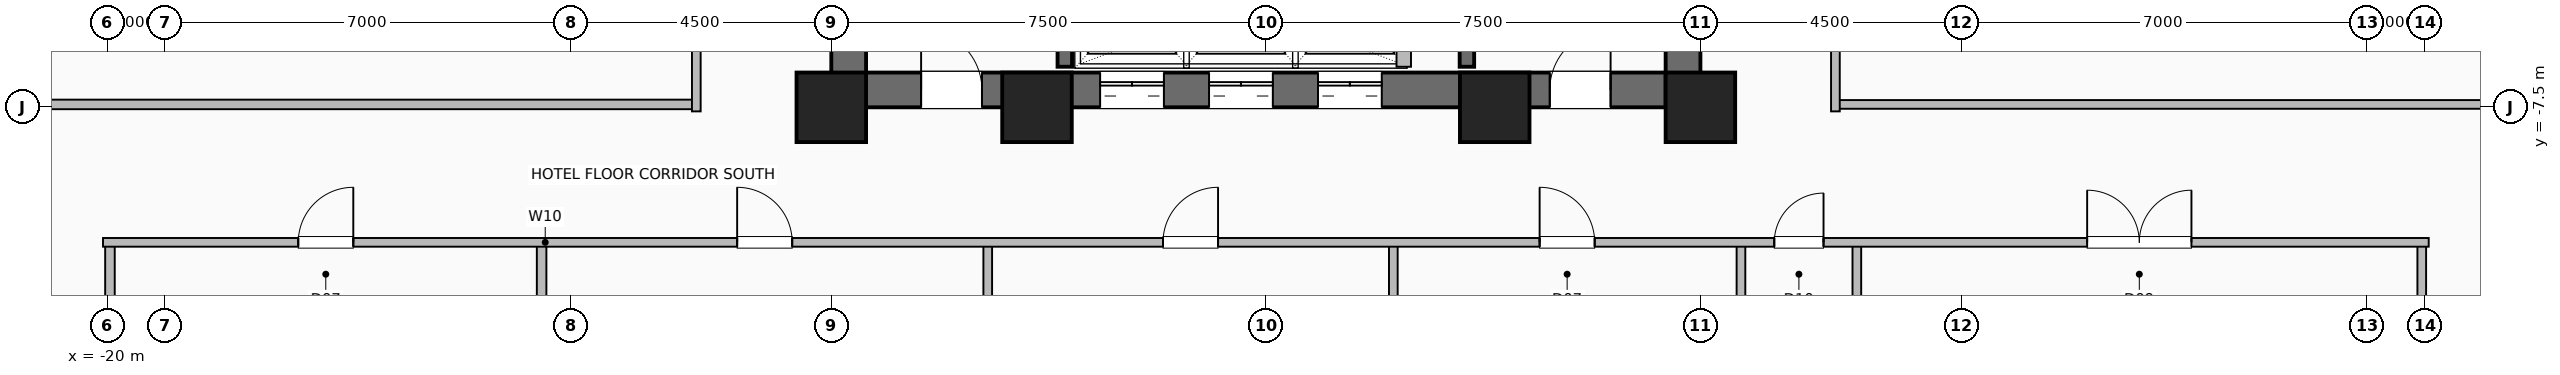
"""IFC4 building model, lengths in metres.
Left out: names, types, materials, properties, quantities, classifications, styles, units other than length and angle.
Written with IfcOpenShell. Run it as: python <this file> out.ifc"""

import sys

from ifc_helpers import new_model, si_unit, direction, frame, frame_2d, origin, origin_2d, place, context, subcontext, project, spatial, rectangle, hollow_rectangle, extrude, element, fill, save


model = new_model("IFC4")
c1 = context("Model", 3, precision=1e-05, world=origin(), true_north=direction((0.0, 1.0)))
c2 = subcontext(c1, "Body", "Model", "MODEL_VIEW")
j1 = project(units=[si_unit("LENGTHUNIT", "METRE"), si_unit("PLANEANGLEUNIT", "RADIAN")], contexts=[c1])
p1 = place(None, origin())
s1 = spatial("IfcSite", under=j1, at=p1, CompositionType="ELEMENT")
p2 = place(p1, origin())
s2 = spatial("IfcBuilding", under=s1, at=p2, CompositionType="ELEMENT")
p3 = place(p2, frame((0.0, 0.0, 44.5)))
s3 = spatial("IfcBuildingStorey", under=s2, at=p3, CompositionType="ELEMENT", Elevation=44.5)
for number, where, z_axis, x_axis in (
    (1, (-7.5, -7.5, 0.0), (0.0, 0.0, 1.0), (1.0, 0.0, 0.0)),
    (2, (-3.95, -7.5, 0.0), (0.0, 0.0, 1.0), (1.0, 0.0, 0.0)),
    (3, (3.95, -7.5, 0.0), (0.0, 0.0, 1.0), (1.0, 0.0, 0.0)),
    (4, (7.5, -7.5, 0.0), (0.0, 0.0, 1.0), (1.0, 0.0, 0.0)),
):
    element("IfcColumn", number, at=place(p3, frame(where, z_axis=z_axis, x_axis=x_axis)), inside=s3, PredefinedType="COLUMN", context=c2, shape_type="SweptSolid", body=[
        extrude(hollow_rectangle(XDim=1.2, YDim=1.2, WallThickness=0.055, at=origin_2d()), origin(), (0.0, 0.0, 1.0), 3.5),
    ])
p4 = place(p3, frame((-7.5, -7.2, 0.0), z_axis=(0.0, 0.0, 1.0), x_axis=(1.0, 0.0, 0.0)))
e5 = element("IfcWall", 5, at=p4, inside=s3, PredefinedType="SHEAR", context=c2, shape_type="SweptSolid", body=[
    extrude(rectangle(XDim=15.0, YDim=0.6, at=frame_2d((7.5, 0.0))), origin(), (0.0, 0.0, 1.0), 3.25),
])
p5 = place(p4, frame((1.55, 0.0, 0.0)))
e6 = element("IfcOpeningElement", 6, at=p5, cuts=e5, PredefinedType="OPENING", context=c2, shape_type="SweptSolid", body=[
    extrude(rectangle(XDim=1.05, YDim=2.08, at=frame_2d((0.525, 1.04))), frame((0.0, 0.31, 0.0), z_axis=(0.0, -1.0, 0.0), x_axis=(1.0, 0.0, 0.0)), (0.0, 0.0, 1.0), 0.62),
])
p6 = place(p4, frame((12.4, 0.0, 0.0)))
e7 = element("IfcOpeningElement", 7, at=p6, cuts=e5, PredefinedType="OPENING", context=c2, shape_type="SweptSolid", body=[
    extrude(rectangle(XDim=1.05, YDim=2.08, at=frame_2d((0.525, 1.04))), frame((0.0, 0.31, 0.0), z_axis=(0.0, -1.0, 0.0), x_axis=(1.0, 0.0, 0.0)), (0.0, 0.0, 1.0), 0.62),
])
p7 = place(p4, frame((4.64, 0.0, 0.0)))
e8 = element("IfcOpeningElement", 8, at=p7, cuts=e5, PredefinedType="OPENING", context=c2, shape_type="SweptSolid", body=[
    extrude(rectangle(XDim=1.1, YDim=2.2, at=frame_2d((0.55, 1.1))), frame((0.0, 0.31, 0.0), z_axis=(0.0, -1.0, 0.0), x_axis=(1.0, 0.0, 0.0)), (0.0, 0.0, 1.0), 0.62),
])
p8 = place(p4, frame((6.52, 0.0, 0.0)))
e9 = element("IfcOpeningElement", 9, at=p8, cuts=e5, PredefinedType="OPENING", context=c2, shape_type="SweptSolid", body=[
    extrude(rectangle(XDim=1.1, YDim=2.2, at=frame_2d((0.55, 1.1))), frame((0.0, 0.31, 0.0), z_axis=(0.0, -1.0, 0.0), x_axis=(1.0, 0.0, 0.0)), (0.0, 0.0, 1.0), 0.62),
])
p9 = place(p4, frame((8.4, 0.0, 0.0)))
e10 = element("IfcOpeningElement", 10, at=p9, cuts=e5, PredefinedType="OPENING", context=c2, shape_type="SweptSolid", body=[
    extrude(rectangle(XDim=1.1, YDim=2.2, at=frame_2d((0.55, 1.1))), frame((0.0, 0.31, 0.0), z_axis=(0.0, -1.0, 0.0), x_axis=(1.0, 0.0, 0.0)), (0.0, 0.0, 1.0), 0.62),
])
p10 = place(p3, frame((-7.2, -7.5, 0.0), z_axis=(0.0, 0.0, 1.0), x_axis=(0.0, 1.0, 0.0)))
e11 = element("IfcWall", 11, at=p10, inside=s3, PredefinedType="SHEAR", context=c2, shape_type="SweptSolid", body=[
    extrude(rectangle(XDim=15.0, YDim=0.6, at=frame_2d((7.5, 0.0))), origin(), (0.0, 0.0, 1.0), 3.25),
])
p11 = place(p10, frame((9.5, 0.0, 0.0)))
e12 = element("IfcOpeningElement", 12, at=p11, cuts=e11, PredefinedType="OPENING", context=c2, shape_type="SweptSolid", body=[
    extrude(rectangle(XDim=1.0, YDim=2.08, at=frame_2d((0.5, 1.04))), frame((0.0, 0.31, 0.0), z_axis=(0.0, -1.0, 0.0), x_axis=(1.0, 0.0, 0.0)), (0.0, 0.0, 1.0), 0.62),
])
p12 = place(p3, frame((7.2, -7.5, 0.0), z_axis=(0.0, 0.0, 1.0), x_axis=(0.0, 1.0, 0.0)))
e13 = element("IfcWall", 13, at=p12, inside=s3, PredefinedType="SHEAR", context=c2, shape_type="SweptSolid", body=[
    extrude(rectangle(XDim=15.0, YDim=0.6, at=frame_2d((7.5, 0.0))), origin(), (0.0, 0.0, 1.0), 3.25),
])
for number, where, z_axis, x_axis in (
    (14, (-3.47, -6.8, 0.0), (0.0, 0.0, 1.0), (0.0, 1.0, 0.0)),
    (15, (3.47, -6.8, 0.0), (0.0, 0.0, 1.0), (0.0, 1.0, 0.0)),
):
    element("IfcWall", number, at=place(p3, frame(where, z_axis=z_axis, x_axis=x_axis)), inside=s3, PredefinedType="SHEAR", context=c2, shape_type="SweptSolid", body=[
        extrude(rectangle(XDim=7.72, YDim=0.25, at=frame_2d((3.86, 0.0))), origin(), (0.0, 0.0, 1.0), 3.25),
    ])
p13 = place(p3, frame((2.38, -6.8, 0.0), z_axis=(0.0, 0.0, 1.0), x_axis=(0.0, 1.0, 0.0)))
e16 = element("IfcWall", 16, at=p13, inside=s3, PredefinedType="SHEAR", context=c2, shape_type="SweptSolid", body=[
    extrude(rectangle(XDim=2.22, YDim=0.25, at=frame_2d((1.11, 0.0))), origin(), (0.0, 0.0, 1.0), 3.25),
])
for number, where, z_axis, x_axis in (
    (17, (-19.95, -23.82, 0.0), (0.0, 0.0, 1.0), (0.0, 1.0, 0.0)),
    (18, (-12.5, -23.82, 0.0), (0.0, 0.0, 1.0), (0.0, 1.0, 0.0)),
):
    element("IfcWall", number, at=place(p3, frame(where, z_axis=z_axis, x_axis=x_axis)), inside=s3, PredefinedType="PLUMBINGWALL", context=c2, shape_type="SweptSolid", body=[
        extrude(rectangle(XDim=13.99, YDim=0.165, at=frame_2d((6.995, 0.0))), origin(), (0.0, 0.0, 1.0), 3.25),
    ])
p14 = place(p3, frame((-4.8, -23.82, 0.0), z_axis=(0.0, 0.0, 1.0), x_axis=(0.0, 1.0, 0.0)))
e19 = element("IfcWall", 19, at=p14, inside=s3, PredefinedType="PARTITIONING", context=c2, shape_type="SweptSolid", body=[
    extrude(rectangle(XDim=13.99, YDim=0.15, at=frame_2d((6.995, 0.0))), origin(), (0.0, 0.0, 1.0), 2.818),
])
for number, where, z_axis, x_axis in (
    (20, (2.2, -23.82, 0.0), (0.0, 0.0, 1.0), (0.0, 1.0, 0.0)),
    (21, (8.2, -23.82, 0.0), (0.0, 0.0, 1.0), (0.0, 1.0, 0.0)),
    (22, (10.2, -23.82, 0.0), (0.0, 0.0, 1.0), (0.0, 1.0, 0.0)),
    (23, (19.95, -23.82, 0.0), (0.0, 0.0, 1.0), (0.0, 1.0, 0.0)),
):
    element("IfcWall", number, at=place(p3, frame(where, z_axis=z_axis, x_axis=x_axis)), inside=s3, PredefinedType="PARTITIONING", context=c2, shape_type="SweptSolid", body=[
        extrude(rectangle(XDim=13.99, YDim=0.15, at=frame_2d((6.995, 0.0))), origin(), (0.0, 0.0, 1.0), 3.25),
    ])
p15 = place(p3, frame((-20.07, -9.83, 0.0), z_axis=(0.0, 0.0, 1.0), x_axis=(1.0, 0.0, 0.0)))
e24 = element("IfcWall", 24, at=p15, inside=s3, PredefinedType="PARTITIONING", context=c2, shape_type="SweptSolid", body=[
    extrude(rectangle(XDim=40.14, YDim=0.15, at=frame_2d((20.07, 0.0))), origin(), (0.0, 0.0, 1.0), 3.25),
])
p16 = place(p15, frame((3.37, 0.0, 0.0)))
e25 = element("IfcOpeningElement", 25, at=p16, cuts=e24, PredefinedType="OPENING", context=c2, shape_type="SweptSolid", body=[
    extrude(rectangle(XDim=0.95, YDim=2.06, at=frame_2d((0.475, 1.03))), frame((0.0, 0.085, 0.0), z_axis=(0.0, -1.0, 0.0), x_axis=(1.0, 0.0, 0.0)), (0.0, 0.0, 1.0), 0.17),
])
p17 = place(p15, frame((10.945, 0.0, 0.0)))
e26 = element("IfcOpeningElement", 26, at=p17, cuts=e24, PredefinedType="OPENING", context=c2, shape_type="SweptSolid", body=[
    extrude(rectangle(XDim=0.95, YDim=2.06, at=frame_2d((0.475, 1.03))), frame((0.0, 0.085, 0.0), z_axis=(0.0, -1.0, 0.0), x_axis=(1.0, 0.0, 0.0)), (0.0, 0.0, 1.0), 0.17),
])
p18 = place(p15, frame((18.295, 0.0, 0.0)))
e27 = element("IfcOpeningElement", 27, at=p18, cuts=e24, PredefinedType="OPENING", context=c2, shape_type="SweptSolid", body=[
    extrude(rectangle(XDim=0.95, YDim=2.06, at=frame_2d((0.475, 1.03))), frame((0.0, 0.085, 0.0), z_axis=(0.0, -1.0, 0.0), x_axis=(1.0, 0.0, 0.0)), (0.0, 0.0, 1.0), 0.17),
])
p19 = place(p15, frame((24.795, 0.0, 0.0)))
e28 = element("IfcOpeningElement", 28, at=p19, cuts=e24, PredefinedType="OPENING", context=c2, shape_type="SweptSolid", body=[
    extrude(rectangle(XDim=0.95, YDim=2.06, at=frame_2d((0.475, 1.03))), frame((0.0, 0.085, 0.0), z_axis=(0.0, -1.0, 0.0), x_axis=(1.0, 0.0, 0.0)), (0.0, 0.0, 1.0), 0.17),
])
p20 = place(p15, frame((28.845, 0.0, 0.0)))
e29 = element("IfcOpeningElement", 29, at=p20, cuts=e24, PredefinedType="OPENING", context=c2, shape_type="SweptSolid", body=[
    extrude(rectangle(XDim=0.85, YDim=2.05, at=frame_2d((0.425, 1.025))), frame((0.0, 0.085, 0.0), z_axis=(0.0, -1.0, 0.0), x_axis=(1.0, 0.0, 0.0)), (0.0, 0.0, 1.0), 0.17),
])
p21 = place(p15, frame((34.245, 0.0, 0.0)))
e30 = element("IfcOpeningElement", 30, at=p21, cuts=e24, PredefinedType="OPENING", context=c2, shape_type="SweptSolid", body=[
    extrude(rectangle(XDim=1.8, YDim=2.08, at=frame_2d((0.9, 1.04))), frame((0.0, 0.085, 0.0), z_axis=(0.0, -1.0, 0.0), x_axis=(1.0, 0.0, 0.0)), (0.0, 0.0, 1.0), 0.17),
])
p22 = place(p3, frame((-23.82, -7.45, 0.0), z_axis=(0.0, 0.0, 1.0), x_axis=(1.0, 0.0, 0.0)))
e31 = element("IfcWall", 31, at=p22, inside=s3, PredefinedType="PLUMBINGWALL", context=c2, shape_type="SweptSolid", body=[
    extrude(rectangle(XDim=13.99, YDim=0.165, at=frame_2d((6.995, 0.0))), origin(), (0.0, 0.0, 1.0), 3.25),
])
p23 = place(p3, frame((-9.83, -7.57, 0.0), z_axis=(0.0, 0.0, 1.0), x_axis=(0.0, 1.0, 0.0)))
e32 = element("IfcWall", 32, at=p23, inside=s3, PredefinedType="PARTITIONING", context=c2, shape_type="SweptSolid", body=[
    extrude(rectangle(XDim=15.14, YDim=0.15, at=frame_2d((7.57, 0.0))), origin(), (0.0, 0.0, 1.0), 3.25),
])
p24 = place(p23, frame((4.845, 0.0, 0.0)))
e33 = element("IfcOpeningElement", 33, at=p24, cuts=e32, PredefinedType="OPENING", context=c2, shape_type="SweptSolid", body=[
    extrude(rectangle(XDim=1.8, YDim=2.08, at=frame_2d((0.9, 1.04))), frame((0.0, 0.085, 0.0), z_axis=(0.0, -1.0, 0.0), x_axis=(1.0, 0.0, 0.0)), (0.0, 0.0, 1.0), 0.17),
])
p25 = place(p23, frame((11.77, 0.0, 0.0)))
e34 = element("IfcOpeningElement", 34, at=p25, cuts=e32, PredefinedType="OPENING", context=c2, shape_type="SweptSolid", body=[
    extrude(rectangle(XDim=0.85, YDim=2.05, at=frame_2d((0.425, 1.025))), frame((0.0, 0.085, 0.0), z_axis=(0.0, -1.0, 0.0), x_axis=(1.0, 0.0, 0.0)), (0.0, 0.0, 1.0), 0.17),
])
p26 = place(p23, frame((13.545, 0.0, 0.0)))
e35 = element("IfcOpeningElement", 35, at=p26, cuts=e32, PredefinedType="OPENING", context=c2, shape_type="SweptSolid", body=[
    extrude(rectangle(XDim=0.95, YDim=2.06, at=frame_2d((0.475, 1.03))), frame((0.0, 0.085, 0.0), z_axis=(0.0, -1.0, 0.0), x_axis=(1.0, 0.0, 0.0)), (0.0, 0.0, 1.0), 0.17),
])
p27 = place(p3, frame((9.83, -7.45, 0.0), z_axis=(0.0, 0.0, 1.0), x_axis=(1.0, 0.0, 0.0)))
e36 = element("IfcWall", 36, at=p27, inside=s3, PredefinedType="PARTITIONING", context=c2, shape_type="SweptSolid", body=[
    extrude(rectangle(XDim=13.99, YDim=0.15, at=frame_2d((6.995, 0.0))), origin(), (0.0, 0.0, 1.0), 3.25),
])
p28 = place(p3, frame((9.83, -7.57, 0.0), z_axis=(0.0, 0.0, 1.0), x_axis=(0.0, 1.0, 0.0)))
e37 = element("IfcWall", 37, at=p28, inside=s3, PredefinedType="PARTITIONING", context=c2, shape_type="SweptSolid", body=[
    extrude(rectangle(XDim=15.14, YDim=0.15, at=frame_2d((7.57, 0.0))), origin(), (0.0, 0.0, 1.0), 3.25),
])
p29 = place(p28, frame((2.12, 0.0, 0.0)))
e38 = element("IfcOpeningElement", 38, at=p29, cuts=e37, PredefinedType="OPENING", context=c2, shape_type="SweptSolid", body=[
    extrude(rectangle(XDim=0.95, YDim=2.06, at=frame_2d((0.475, 1.03))), frame((0.0, 0.085, 0.0), z_axis=(0.0, -1.0, 0.0), x_axis=(1.0, 0.0, 0.0)), (0.0, 0.0, 1.0), 0.17),
])
p30 = place(p28, frame((7.095, 0.0, 0.0)))
e39 = element("IfcOpeningElement", 39, at=p30, cuts=e37, PredefinedType="OPENING", context=c2, shape_type="SweptSolid", body=[
    extrude(rectangle(XDim=0.95, YDim=2.06, at=frame_2d((0.475, 1.03))), frame((0.0, 0.085, 0.0), z_axis=(0.0, -1.0, 0.0), x_axis=(1.0, 0.0, 0.0)), (0.0, 0.0, 1.0), 0.17),
])
p31 = place(p28, frame((12.07, 0.0, 0.0)))
e40 = element("IfcOpeningElement", 40, at=p31, cuts=e37, PredefinedType="OPENING", context=c2, shape_type="SweptSolid", body=[
    extrude(rectangle(XDim=0.95, YDim=2.06, at=frame_2d((0.475, 1.03))), frame((0.0, 0.085, 0.0), z_axis=(0.0, -1.0, 0.0), x_axis=(1.0, 0.0, 0.0)), (0.0, 0.0, 1.0), 0.17),
])
p32 = place(p5, origin())
e41 = element("IfcDoor", 41, at=p32, inside=s3, OperationType="SINGLE_SWING_LEFT", PredefinedType="DOOR", context=c2, shape_type="SweptSolid", body=[
    extrude(rectangle(XDim=1.05, YDim=2.08, at=frame_2d((0.525, 1.04))), frame((0.0, 0.025, 0.0), z_axis=(0.0, -1.0, 0.0), x_axis=(1.0, 0.0, 0.0)), (0.0, 0.0, 1.0), 0.05),
])
fill(e6, e41)
p33 = place(p6, origin())
e42 = element("IfcDoor", 42, at=p33, inside=s3, OperationType="SINGLE_SWING_RIGHT", PredefinedType="DOOR", context=c2, shape_type="SweptSolid", body=[
    extrude(rectangle(XDim=1.05, YDim=2.08, at=frame_2d((0.525, 1.04))), frame((0.0, 0.025, 0.0), z_axis=(0.0, -1.0, 0.0), x_axis=(1.0, 0.0, 0.0)), (0.0, 0.0, 1.0), 0.05),
])
fill(e7, e42)
p34 = place(p7, origin())
e43 = element("IfcDoor", 43, at=p34, inside=s3, OperationType="DOUBLE_DOOR_SLIDING", PredefinedType="DOOR", context=c2, shape_type="SweptSolid", body=[
    extrude(rectangle(XDim=1.1, YDim=2.2, at=frame_2d((0.55, 1.1))), frame((0.0, 0.025, 0.0), z_axis=(0.0, -1.0, 0.0), x_axis=(1.0, 0.0, 0.0)), (0.0, 0.0, 1.0), 0.05),
])
fill(e8, e43)
p35 = place(p8, origin())
e44 = element("IfcDoor", 44, at=p35, inside=s3, OperationType="DOUBLE_DOOR_SLIDING", PredefinedType="DOOR", context=c2, shape_type="SweptSolid", body=[
    extrude(rectangle(XDim=1.1, YDim=2.2, at=frame_2d((0.55, 1.1))), frame((0.0, 0.025, 0.0), z_axis=(0.0, -1.0, 0.0), x_axis=(1.0, 0.0, 0.0)), (0.0, 0.0, 1.0), 0.05),
])
fill(e9, e44)
p36 = place(p9, origin())
e45 = element("IfcDoor", 45, at=p36, inside=s3, OperationType="DOUBLE_DOOR_SLIDING", PredefinedType="DOOR", context=c2, shape_type="SweptSolid", body=[
    extrude(rectangle(XDim=1.1, YDim=2.2, at=frame_2d((0.55, 1.1))), frame((0.0, 0.025, 0.0), z_axis=(0.0, -1.0, 0.0), x_axis=(1.0, 0.0, 0.0)), (0.0, 0.0, 1.0), 0.05),
])
fill(e10, e45)
p37 = place(p16, origin())
e46 = element("IfcDoor", 46, at=p37, inside=s3, OperationType="SINGLE_SWING_RIGHT", PredefinedType="DOOR", context=c2, shape_type="SweptSolid", body=[
    extrude(rectangle(XDim=0.95, YDim=2.06, at=frame_2d((0.475, 1.03))), frame((0.0, 0.025, 0.0), z_axis=(0.0, -1.0, 0.0), x_axis=(1.0, 0.0, 0.0)), (0.0, 0.0, 1.0), 0.05),
])
fill(e25, e46)
p38 = place(p17, origin())
e47 = element("IfcDoor", 47, at=p38, inside=s3, OperationType="SINGLE_SWING_LEFT", PredefinedType="DOOR", context=c2, shape_type="SweptSolid", body=[
    extrude(rectangle(XDim=0.95, YDim=2.06, at=frame_2d((0.475, 1.03))), frame((0.0, 0.025, 0.0), z_axis=(0.0, -1.0, 0.0), x_axis=(1.0, 0.0, 0.0)), (0.0, 0.0, 1.0), 0.05),
])
fill(e26, e47)
p39 = place(p18, origin())
e48 = element("IfcDoor", 48, at=p39, inside=s3, OperationType="SINGLE_SWING_RIGHT", PredefinedType="DOOR", context=c2, shape_type="SweptSolid", body=[
    extrude(rectangle(XDim=0.95, YDim=2.06, at=frame_2d((0.475, 1.03))), frame((0.0, 0.025, 0.0), z_axis=(0.0, -1.0, 0.0), x_axis=(1.0, 0.0, 0.0)), (0.0, 0.0, 1.0), 0.05),
])
fill(e27, e48)
p40 = place(p19, origin())
e49 = element("IfcDoor", 49, at=p40, inside=s3, OperationType="SINGLE_SWING_LEFT", PredefinedType="DOOR", context=c2, shape_type="SweptSolid", body=[
    extrude(rectangle(XDim=0.95, YDim=2.06, at=frame_2d((0.475, 1.03))), frame((0.0, 0.025, 0.0), z_axis=(0.0, -1.0, 0.0), x_axis=(1.0, 0.0, 0.0)), (0.0, 0.0, 1.0), 0.05),
])
fill(e28, e49)
p41 = place(p20, origin())
e50 = element("IfcDoor", 50, at=p41, inside=s3, OperationType="SINGLE_SWING_RIGHT", PredefinedType="DOOR", context=c2, shape_type="SweptSolid", body=[
    extrude(rectangle(XDim=0.85, YDim=2.05, at=frame_2d((0.425, 1.025))), frame((0.0, 0.025, 0.0), z_axis=(0.0, -1.0, 0.0), x_axis=(1.0, 0.0, 0.0)), (0.0, 0.0, 1.0), 0.05),
])
fill(e29, e50)
p42 = place(p21, origin())
e51 = element("IfcDoor", 51, at=p42, inside=s3, OperationType="DOUBLE_DOOR_SINGLE_SWING", PredefinedType="DOOR", context=c2, shape_type="SweptSolid", body=[
    extrude(rectangle(XDim=1.8, YDim=2.08, at=frame_2d((0.9, 1.04))), frame((0.0, 0.025, 0.0), z_axis=(0.0, -1.0, 0.0), x_axis=(1.0, 0.0, 0.0)), (0.0, 0.0, 1.0), 0.05),
])
fill(e30, e51)
save(model, sys.argv[1])
